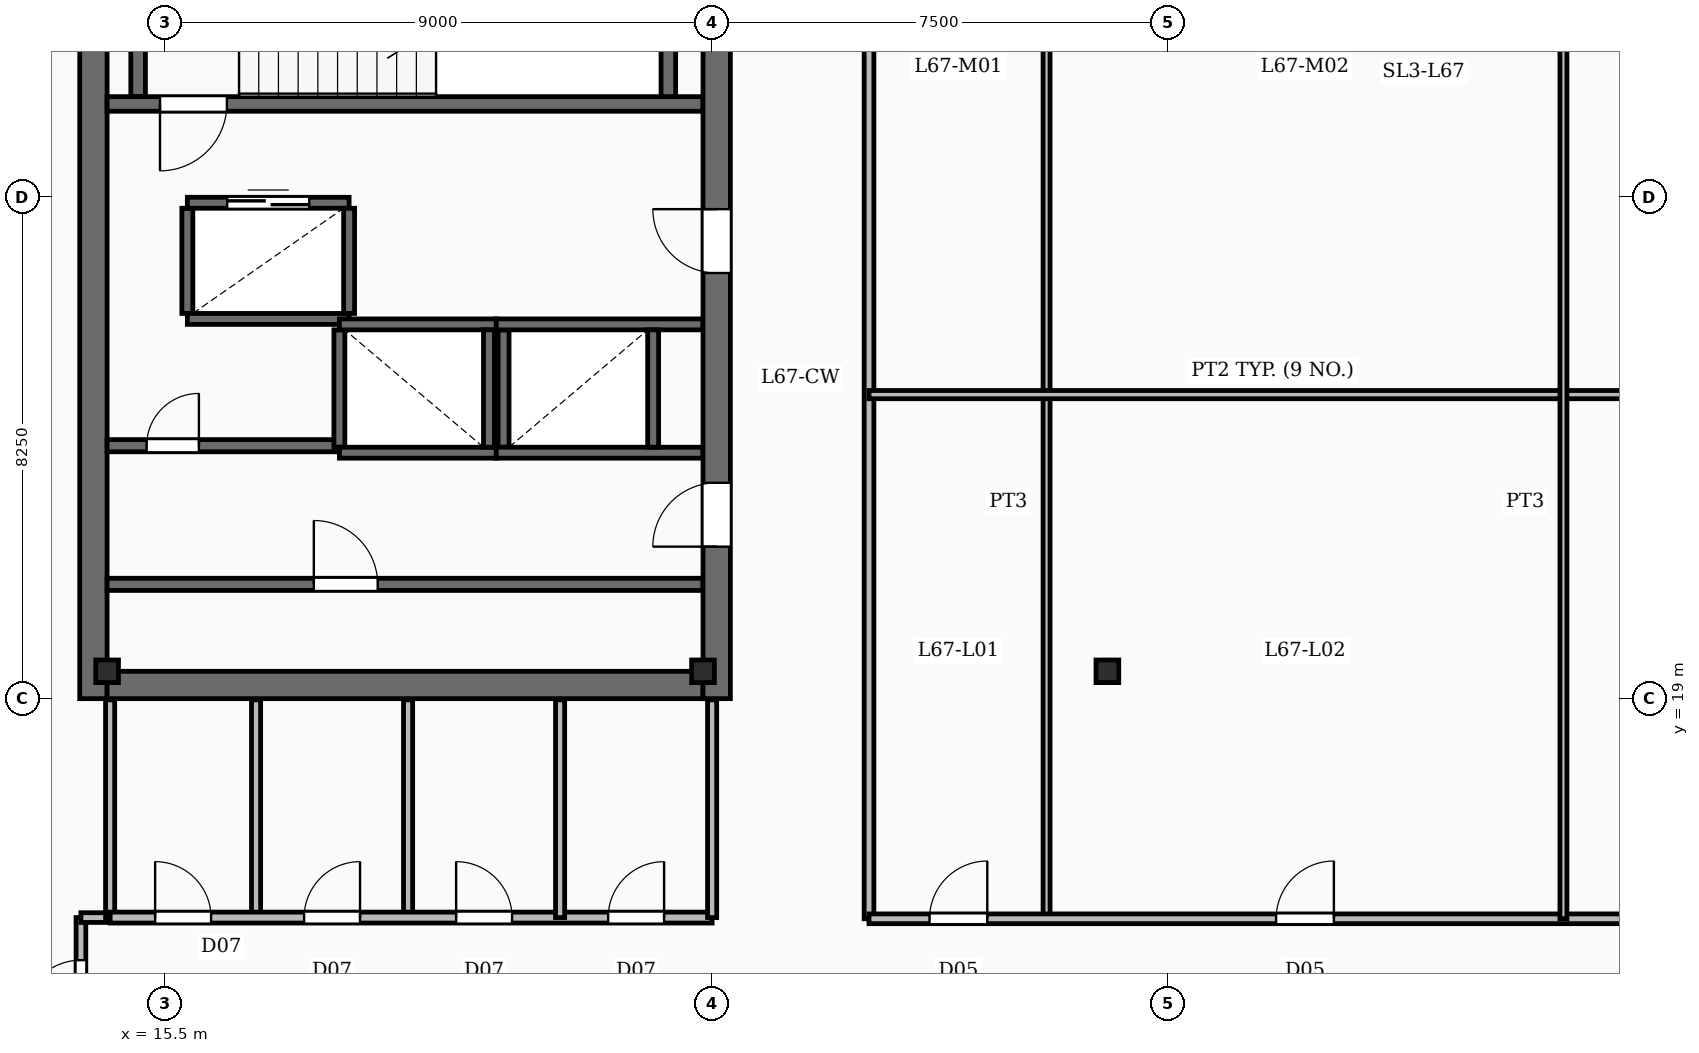
"""IFC4 building model, lengths in metres.
Left out: names, types, materials, properties, quantities, classifications, styles, units other than length and angle.
Written with IfcOpenShell. Run it as: python <this file> out.ifc"""

import sys

from ifc_helpers import new_model, si_unit, direction, frame, frame_2d, origin, origin_2d, place, context, subcontext, project, spatial, rectangle, i_section, extrude, element, fill, save


model = new_model("IFC4")
c1 = context("Model", 3, precision=1e-05, world=origin(), true_north=direction((0.0, 1.0)))
c2 = subcontext(c1, "Body", "Model", "MODEL_VIEW")
j1 = project(units=[si_unit("LENGTHUNIT", "METRE"), si_unit("PLANEANGLEUNIT", "RADIAN")], contexts=[c1])
p1 = place(None, origin())
s1 = spatial("IfcSite", under=j1, at=p1, CompositionType="ELEMENT")
p2 = place(p1, origin())
s2 = spatial("IfcBuilding", under=s1, at=p2, CompositionType="ELEMENT")
p3 = place(p2, frame((0.0, 0.0, 274.9)))
s3 = spatial("IfcBuildingStorey", under=s2, at=p3, CompositionType="ELEMENT", Elevation=274.9)
p4 = place(p3, frame((14.325, 19.0, -0.45), z_axis=(0.0, 0.0, 1.0), x_axis=(0.0, 1.0, 0.0)))
e1 = element("IfcWall", 1, at=p4, inside=s3, PredefinedType="SHEAR", context=c2, shape_type="SweptSolid", body=[
    extrude(rectangle(XDim=15.3, YDim=0.45, at=frame_2d((7.65, 0.0))), origin(), (0.0, 0.0, 1.0), 3.93),
])
p5 = place(p3, frame((24.575, 19.0, -0.45), z_axis=(0.0, 0.0, 1.0), x_axis=(0.0, 1.0, 0.0)))
e2 = element("IfcWall", 2, at=p5, inside=s3, PredefinedType="SHEAR", context=c2, shape_type="SweptSolid", body=[
    extrude(rectangle(XDim=15.3, YDim=0.45, at=frame_2d((7.65, 0.0))), origin(), (0.0, 0.0, 1.0), 3.93),
])
p6 = place(p5, frame((2.5, 0.0, 0.45)))
e3 = element("IfcOpeningElement", 3, at=p6, cuts=e2, PredefinedType="OPENING", context=c2, shape_type="SweptSolid", body=[
    extrude(rectangle(XDim=1.05, YDim=2.15, at=frame_2d((0.525, 1.075))), frame((0.0, 0.235, 0.0), z_axis=(0.0, -1.0, 0.0), x_axis=(1.0, 0.0, 0.0)), (0.0, 0.0, 1.0), 0.47),
])
p7 = place(p5, frame((7.0, 0.0, 0.45)))
e4 = element("IfcOpeningElement", 4, at=p7, cuts=e2, PredefinedType="OPENING", context=c2, shape_type="SweptSolid", body=[
    extrude(rectangle(XDim=1.05, YDim=2.15, at=frame_2d((0.525, 1.075))), frame((0.0, 0.235, 0.0), z_axis=(0.0, -1.0, 0.0), x_axis=(1.0, 0.0, 0.0)), (0.0, 0.0, 1.0), 0.47),
])
p8 = place(p3, frame((14.55, 19.225, -0.45), z_axis=(0.0, 0.0, 1.0), x_axis=(1.0, 0.0, 0.0)))
e5 = element("IfcWall", 5, at=p8, inside=s3, PredefinedType="SHEAR", context=c2, shape_type="SweptSolid", body=[
    extrude(rectangle(XDim=9.8, YDim=0.45, at=frame_2d((4.9, 0.0))), origin(), (0.0, 0.0, 1.0), 3.93),
])
for number, where, z_axis, x_axis in (
    (6, (14.55, 19.45, -0.45), (0.0, 0.0, 1.0), (1.0, 0.0, 0.0)),
    (7, (24.35, 19.45, -0.45), (0.0, 0.0, 1.0), (1.0, 0.0, 0.0)),
    (8, (31.0, 19.45, -0.45), (0.0, 0.0, 1.0), (1.0, 0.0, 0.0)),
):
    element("IfcColumn", number, at=place(p3, frame(where, z_axis=z_axis, x_axis=x_axis)), inside=s3, PredefinedType="COLUMN", context=c2, shape_type="SweptSolid", body=[
        extrude(i_section(OverallWidth=0.374, OverallDepth=0.372, WebThickness=0.016, FlangeThickness=0.026, FilletRadius=0.02, at=origin_2d()), origin(), (0.0, 0.0, 1.0), 3.93),
    ])
p9 = place(p3, frame((24.35, 28.78, 0.0), z_axis=(0.0, 0.0, 1.0), x_axis=(-1.0, 0.0, 0.0)))
e9 = element("IfcWall", 9, at=p9, inside=s3, PredefinedType="SOLIDWALL", context=c2, shape_type="SweptSolid", body=[
    extrude(rectangle(XDim=9.8, YDim=0.24, at=frame_2d((4.9, 0.0))), origin(), (0.0, 0.0, 1.0), 3.48),
])
p10 = place(p9, frame((7.83, 0.0, 0.0)))
e10 = element("IfcOpeningElement", 10, at=p10, cuts=e9, PredefinedType="OPENING", context=c2, shape_type="SweptSolid", body=[
    extrude(rectangle(XDim=1.1, YDim=2.15, at=frame_2d((0.55, 1.075))), frame((0.0, 0.13, 0.0), z_axis=(0.0, -1.0, 0.0), x_axis=(1.0, 0.0, 0.0)), (0.0, 0.0, 1.0), 0.26),
])
for number, where, z_axis, x_axis in (
    (11, (15.06, 28.9, 0.0), (0.0, 0.0, 1.0), (0.0, 1.0, 0.0)),
    (12, (23.78, 28.9, 0.0), (0.0, 0.0, 1.0), (0.0, 1.0, 0.0)),
):
    element("IfcWall", number, at=place(p3, frame(where, z_axis=z_axis, x_axis=x_axis)), inside=s3, PredefinedType="SOLIDWALL", context=c2, shape_type="SweptSolid", body=[
        extrude(rectangle(XDim=3.23, YDim=0.24, at=frame_2d((1.615, 0.0))), origin(), (0.0, 0.0, 1.0), 3.48),
    ])
for number, where, z_axis, x_axis in (
    (13, (18.37, 25.155, 0.0), (0.0, 0.0, 1.0), (1.0, 0.0, 0.0)),
    (14, (18.37, 23.045, 0.0), (0.0, 0.0, 1.0), (1.0, 0.0, 0.0)),
):
    element("IfcWall", number, at=place(p3, frame(where, z_axis=z_axis, x_axis=x_axis)), inside=s3, PredefinedType="SOLIDWALL", context=c2, shape_type="SweptSolid", body=[
        extrude(rectangle(XDim=2.58, YDim=0.18, at=frame_2d((1.29, 0.0))), origin(), (0.0, 0.0, 1.0), 3.48),
    ])
for number, where, z_axis, x_axis in (
    (15, (18.37, 23.135, 0.0), (0.0, 0.0, 1.0), (0.0, 1.0, 0.0)),
    (16, (20.83, 23.135, 0.0), (0.0, 0.0, 1.0), (0.0, 1.0, 0.0)),
):
    element("IfcWall", number, at=place(p3, frame(where, z_axis=z_axis, x_axis=x_axis)), inside=s3, PredefinedType="SOLIDWALL", context=c2, shape_type="SweptSolid", body=[
        extrude(rectangle(XDim=1.93, YDim=0.18, at=frame_2d((0.965, 0.0))), origin(), (0.0, 0.0, 1.0), 3.48),
    ])
for number, where, z_axis, x_axis in (
    (17, (20.95, 25.155, 0.0), (0.0, 0.0, 1.0), (1.0, 0.0, 0.0)),
    (18, (20.95, 23.045, 0.0), (0.0, 0.0, 1.0), (1.0, 0.0, 0.0)),
):
    element("IfcWall", number, at=place(p3, frame(where, z_axis=z_axis, x_axis=x_axis)), inside=s3, PredefinedType="SOLIDWALL", context=c2, shape_type="SweptSolid", body=[
        extrude(rectangle(XDim=3.4, YDim=0.18, at=frame_2d((1.7, 0.0))), origin(), (0.0, 0.0, 1.0), 3.48),
    ])
for number, where, z_axis, x_axis in (
    (19, (21.07, 23.135, 0.0), (0.0, 0.0, 1.0), (0.0, 1.0, 0.0)),
    (20, (23.53, 23.135, 0.0), (0.0, 0.0, 1.0), (0.0, 1.0, 0.0)),
):
    element("IfcWall", number, at=place(p3, frame(where, z_axis=z_axis, x_axis=x_axis)), inside=s3, PredefinedType="SOLIDWALL", context=c2, shape_type="SweptSolid", body=[
        extrude(rectangle(XDim=1.93, YDim=0.18, at=frame_2d((0.965, 0.0))), origin(), (0.0, 0.0, 1.0), 3.48),
    ])
p11 = place(p3, frame((15.87, 27.155, 0.0), z_axis=(0.0, 0.0, 1.0), x_axis=(1.0, 0.0, 0.0)))
e21 = element("IfcWall", 21, at=p11, inside=s3, PredefinedType="SOLIDWALL", context=c2, shape_type="SweptSolid", body=[
    extrude(rectangle(XDim=2.66, YDim=0.18, at=frame_2d((1.33, 0.0))), origin(), (0.0, 0.0, 1.0), 3.48),
])
p12 = place(p11, frame((0.655, 0.0, 0.0)))
e22 = element("IfcOpeningElement", 22, at=p12, cuts=e21, PredefinedType="OPENING", context=c2, shape_type="SweptSolid", body=[
    extrude(rectangle(XDim=1.35, YDim=2.3, at=frame_2d((0.675, 1.15))), frame((0.0, 0.1, 0.0), z_axis=(0.0, -1.0, 0.0), x_axis=(1.0, 0.0, 0.0)), (0.0, 0.0, 1.0), 0.2),
])
p13 = place(p3, frame((15.87, 25.245, 0.0), z_axis=(0.0, 0.0, 1.0), x_axis=(1.0, 0.0, 0.0)))
e23 = element("IfcWall", 23, at=p13, inside=s3, PredefinedType="SOLIDWALL", context=c2, shape_type="SweptSolid", body=[
    extrude(rectangle(XDim=2.66, YDim=0.18, at=frame_2d((1.33, 0.0))), origin(), (0.0, 0.0, 1.0), 3.48),
])
for number, where, z_axis, x_axis in (
    (24, (15.87, 25.335, 0.0), (0.0, 0.0, 1.0), (0.0, 1.0, 0.0)),
    (25, (18.53, 25.335, 0.0), (0.0, 0.0, 1.0), (0.0, 1.0, 0.0)),
):
    element("IfcWall", number, at=place(p3, frame(where, z_axis=z_axis, x_axis=x_axis)), inside=s3, PredefinedType="SOLIDWALL", context=c2, shape_type="SweptSolid", body=[
        extrude(rectangle(XDim=1.73, YDim=0.18, at=frame_2d((0.865, 0.0))), origin(), (0.0, 0.0, 1.0), 3.48),
    ])
p14 = place(p3, frame((14.55, 20.88, 0.0), z_axis=(0.0, 0.0, 1.0), x_axis=(1.0, 0.0, 0.0)))
e26 = element("IfcWall", 26, at=p14, inside=s3, PredefinedType="SOLIDWALL", context=c2, shape_type="SweptSolid", body=[
    extrude(rectangle(XDim=9.8, YDim=0.2, at=frame_2d((4.9, 0.0))), origin(), (0.0, 0.0, 1.0), 2.54),
])
p15 = place(p14, frame((3.4, 0.0, 0.0)))
e27 = element("IfcOpeningElement", 27, at=p15, cuts=e26, PredefinedType="OPENING", context=c2, shape_type="SweptSolid", body=[
    extrude(rectangle(XDim=1.05, YDim=2.15, at=frame_2d((0.525, 1.075))), frame((0.0, 0.11, 0.0), z_axis=(0.0, -1.0, 0.0), x_axis=(1.0, 0.0, 0.0)), (0.0, 0.0, 1.0), 0.22),
])
p16 = place(p3, frame((14.55, 23.16, 0.0), z_axis=(0.0, 0.0, 1.0), x_axis=(1.0, 0.0, 0.0)))
e28 = element("IfcWall", 28, at=p16, inside=s3, PredefinedType="SOLIDWALL", context=c2, shape_type="SweptSolid", body=[
    extrude(rectangle(XDim=3.82, YDim=0.2, at=frame_2d((1.91, 0.0))), origin(), (0.0, 0.0, 1.0), 2.54),
])
p17 = place(p16, frame((0.65, 0.0, 0.0)))
e29 = element("IfcOpeningElement", 29, at=p17, cuts=e28, PredefinedType="OPENING", context=c2, shape_type="SweptSolid", body=[
    extrude(rectangle(XDim=0.86, YDim=2.05, at=frame_2d((0.43, 1.025))), frame((0.0, 0.11, 0.0), z_axis=(0.0, -1.0, 0.0), x_axis=(1.0, 0.0, 0.0)), (0.0, 0.0, 1.0), 0.22),
])
for number, where, z_axis, x_axis in (
    (30, (17.0, 15.4, 0.0), (0.0, 0.0, 1.0), (0.0, 1.0, 0.0)),
    (31, (19.5, 15.4, 0.0), (0.0, 0.0, 1.0), (0.0, 1.0, 0.0)),
    (32, (22.0, 15.4, 0.0), (0.0, 0.0, 1.0), (0.0, 1.0, 0.0)),
):
    element("IfcWall", number, at=place(p3, frame(where, z_axis=z_axis, x_axis=x_axis)), inside=s3, PredefinedType="PARTITIONING", context=c2, shape_type="SweptSolid", body=[
        extrude(rectangle(XDim=3.58, YDim=0.15, at=frame_2d((1.79, 0.0))), origin(), (0.0, 0.0, 1.0), 2.54),
    ])
p18 = place(p3, frame((14.6, 15.4, 0.0), z_axis=(0.0, 0.0, 1.0), x_axis=(1.0, 0.0, 0.0)))
e33 = element("IfcWall", 33, at=p18, inside=s3, PredefinedType="PARTITIONING", context=c2, shape_type="SweptSolid", body=[
    extrude(rectangle(XDim=9.9, YDim=0.18, at=frame_2d((4.95, 0.0))), origin(), (0.0, 0.0, 1.0), 2.54),
])
p19 = place(p18, frame((0.74, 0.0, 0.0)))
e34 = element("IfcOpeningElement", 34, at=p19, cuts=e33, PredefinedType="OPENING", context=c2, shape_type="SweptSolid", body=[
    extrude(rectangle(XDim=0.92, YDim=2.1, at=frame_2d((0.46, 1.05))), frame((0.0, 0.1, 0.0), z_axis=(0.0, -1.0, 0.0), x_axis=(1.0, 0.0, 0.0)), (0.0, 0.0, 1.0), 0.2),
])
p20 = place(p18, frame((3.19, 0.0, 0.0)))
e35 = element("IfcOpeningElement", 35, at=p20, cuts=e33, PredefinedType="OPENING", context=c2, shape_type="SweptSolid", body=[
    extrude(rectangle(XDim=0.92, YDim=2.1, at=frame_2d((0.46, 1.05))), frame((0.0, 0.1, 0.0), z_axis=(0.0, -1.0, 0.0), x_axis=(1.0, 0.0, 0.0)), (0.0, 0.0, 1.0), 0.2),
])
p21 = place(p18, frame((5.69, 0.0, 0.0)))
e36 = element("IfcOpeningElement", 36, at=p21, cuts=e33, PredefinedType="OPENING", context=c2, shape_type="SweptSolid", body=[
    extrude(rectangle(XDim=0.92, YDim=2.1, at=frame_2d((0.46, 1.05))), frame((0.0, 0.1, 0.0), z_axis=(0.0, -1.0, 0.0), x_axis=(1.0, 0.0, 0.0)), (0.0, 0.0, 1.0), 0.2),
])
p22 = place(p18, frame((8.19, 0.0, 0.0)))
e37 = element("IfcOpeningElement", 37, at=p22, cuts=e33, PredefinedType="OPENING", context=c2, shape_type="SweptSolid", body=[
    extrude(rectangle(XDim=0.92, YDim=2.1, at=frame_2d((0.46, 1.05))), frame((0.0, 0.1, 0.0), z_axis=(0.0, -1.0, 0.0), x_axis=(1.0, 0.0, 0.0)), (0.0, 0.0, 1.0), 0.2),
])
for number, where, z_axis, x_axis in (
    (38, (14.6, 15.4, 0.0), (0.0, 0.0, 1.0), (0.0, 1.0, 0.0)),
    (39, (24.5, 15.4, 0.0), (0.0, 0.0, 1.0), (0.0, 1.0, 0.0)),
):
    element("IfcWall", number, at=place(p3, frame(where, z_axis=z_axis, x_axis=x_axis)), inside=s3, PredefinedType="PARTITIONING", context=c2, shape_type="SweptSolid", body=[
        extrude(rectangle(XDim=3.58, YDim=0.15, at=frame_2d((1.79, 0.0))), origin(), (0.0, 0.0, 1.0), 2.54),
    ])
for number, where, z_axis, x_axis in (
    (40, (30.0, 15.38, 0.0), (0.0, 0.0, 1.0), (0.0, 1.0, 0.0)),
    (41, (38.5, 15.38, 0.0), (0.0, 0.0, 1.0), (0.0, 1.0, 0.0)),
):
    element("IfcWall", number, at=place(p3, frame(where, z_axis=z_axis, x_axis=x_axis)), inside=s3, PredefinedType="PARTITIONING", context=c2, shape_type="SweptSolid", body=[
        extrude(rectangle(XDim=19.6, YDim=0.115, at=frame_2d((9.8, 0.0))), origin(), (0.0, 0.0, 1.0), 2.54),
    ])
p23 = place(p3, frame((27.08, 24.0, 0.0), z_axis=(0.0, 0.0, 1.0), x_axis=(1.0, 0.0, 0.0)))
e42 = element("IfcWall", 42, at=p23, inside=s3, PredefinedType="PARTITIONING", context=c2, shape_type="SweptSolid", body=[
    extrude(rectangle(XDim=20.74, YDim=0.135, at=frame_2d((10.37, 0.0))), origin(), (0.0, 0.0, 1.0), 2.54),
])
p24 = place(p3, frame((27.08, 15.38, 0.0), z_axis=(0.0, 0.0, 1.0), x_axis=(1.0, 0.0, 0.0)))
e43 = element("IfcWall", 43, at=p24, inside=s3, PredefinedType="PARTITIONING", context=c2, shape_type="SweptSolid", body=[
    extrude(rectangle(XDim=20.74, YDim=0.16, at=frame_2d((10.37, 0.0))), origin(), (0.0, 0.0, 1.0), 2.54),
])
p25 = place(p24, frame((0.995, 0.0, 0.0)))
e44 = element("IfcOpeningElement", 44, at=p25, cuts=e43, PredefinedType="OPENING", context=c2, shape_type="SweptSolid", body=[
    extrude(rectangle(XDim=0.95, YDim=2.15, at=frame_2d((0.475, 1.075))), frame((0.0, 0.09, 0.0), z_axis=(0.0, -1.0, 0.0), x_axis=(1.0, 0.0, 0.0)), (0.0, 0.0, 1.0), 0.18),
])
p26 = place(p24, frame((6.695, 0.0, 0.0)))
e45 = element("IfcOpeningElement", 45, at=p26, cuts=e43, PredefinedType="OPENING", context=c2, shape_type="SweptSolid", body=[
    extrude(rectangle(XDim=0.95, YDim=2.15, at=frame_2d((0.475, 1.075))), frame((0.0, 0.09, 0.0), z_axis=(0.0, -1.0, 0.0), x_axis=(1.0, 0.0, 0.0)), (0.0, 0.0, 1.0), 0.18),
])
p27 = place(p24, frame((13.945, 0.0, 0.0)))
e46 = element("IfcOpeningElement", 46, at=p27, cuts=e43, PredefinedType="OPENING", context=c2, shape_type="SweptSolid", body=[
    extrude(rectangle(XDim=0.95, YDim=2.15, at=frame_2d((0.475, 1.075))), frame((0.0, 0.09, 0.0), z_axis=(0.0, -1.0, 0.0), x_axis=(1.0, 0.0, 0.0)), (0.0, 0.0, 1.0), 0.18),
])
p28 = place(p24, frame((18.595, 0.0, 0.0)))
e47 = element("IfcOpeningElement", 47, at=p28, cuts=e43, PredefinedType="OPENING", context=c2, shape_type="SweptSolid", body=[
    extrude(rectangle(XDim=0.95, YDim=2.15, at=frame_2d((0.475, 1.075))), frame((0.0, 0.09, 0.0), z_axis=(0.0, -1.0, 0.0), x_axis=(1.0, 0.0, 0.0)), (0.0, 0.0, 1.0), 0.18),
])
p29 = place(p3, frame((27.08, 15.38, 0.0), z_axis=(0.0, 0.0, 1.0), x_axis=(0.0, 1.0, 0.0)))
e48 = element("IfcWall", 48, at=p29, inside=s3, PredefinedType="PARTITIONING", context=c2, shape_type="SweptSolid", body=[
    extrude(rectangle(XDim=19.6, YDim=0.16, at=frame_2d((9.8, 0.0))), origin(), (0.0, 0.0, 1.0), 2.54),
])
p30 = place(p3, frame((14.12, 13.1, 0.0), z_axis=(0.0, 0.0, 1.0), x_axis=(0.0, 1.0, 0.0)))
e49 = element("IfcWall", 49, at=p30, inside=s3, PredefinedType="PARTITIONING", context=c2, shape_type="SweptSolid", body=[
    extrude(rectangle(XDim=2.3, YDim=0.16, at=frame_2d((1.15, 0.0))), origin(), (0.0, 0.0, 1.0), 2.54),
])
p31 = place(p30, frame((0.65, 0.0, 0.0)))
e50 = element("IfcOpeningElement", 50, at=p31, cuts=e49, PredefinedType="OPENING", context=c2, shape_type="SweptSolid", body=[
    extrude(rectangle(XDim=0.95, YDim=2.15, at=frame_2d((0.475, 1.075))), frame((0.0, 0.09, 0.0), z_axis=(0.0, -1.0, 0.0), x_axis=(1.0, 0.0, 0.0)), (0.0, 0.0, 1.0), 0.18),
])
p32 = place(p3, frame((14.12, 15.4, 0.0), z_axis=(0.0, 0.0, 1.0), x_axis=(1.0, 0.0, 0.0)))
e51 = element("IfcWall", 51, at=p32, inside=s3, PredefinedType="PARTITIONING", context=c2, shape_type="SweptSolid", body=[
    extrude(rectangle(XDim=0.5, YDim=0.16, at=frame_2d((0.25, 0.0))), origin(), (0.0, 0.0, 1.0), 2.54),
])
p33 = place(p6, origin())
e52 = element("IfcDoor", 52, at=p33, inside=s3, OperationType="SINGLE_SWING_LEFT", PredefinedType="DOOR", context=c2, shape_type="SweptSolid", body=[
    extrude(rectangle(XDim=1.05, YDim=2.15, at=frame_2d((0.525, 1.075))), frame((0.0, 0.025, 0.0), z_axis=(0.0, -1.0, 0.0), x_axis=(1.0, 0.0, 0.0)), (0.0, 0.0, 1.0), 0.05),
])
fill(e3, e52)
p34 = place(p7, origin())
e53 = element("IfcDoor", 53, at=p34, inside=s3, OperationType="SINGLE_SWING_RIGHT", PredefinedType="DOOR", context=c2, shape_type="SweptSolid", body=[
    extrude(rectangle(XDim=1.05, YDim=2.15, at=frame_2d((0.525, 1.075))), frame((0.0, 0.025, 0.0), z_axis=(0.0, -1.0, 0.0), x_axis=(1.0, 0.0, 0.0)), (0.0, 0.0, 1.0), 0.05),
])
fill(e4, e53)
p35 = place(p10, origin())
e54 = element("IfcDoor", 54, at=p35, inside=s3, OperationType="SINGLE_SWING_RIGHT", PredefinedType="DOOR", context=c2, shape_type="SweptSolid", body=[
    extrude(rectangle(XDim=1.1, YDim=2.15, at=frame_2d((0.55, 1.075))), frame((0.0, 0.025, 0.0), z_axis=(0.0, -1.0, 0.0), x_axis=(1.0, 0.0, 0.0)), (0.0, 0.0, 1.0), 0.05),
])
fill(e10, e54)
p36 = place(p12, origin())
e55 = element("IfcDoor", 55, at=p36, inside=s3, OperationType="DOUBLE_DOOR_SLIDING", PredefinedType="DOOR", context=c2, shape_type="SweptSolid", body=[
    extrude(rectangle(XDim=1.35, YDim=2.3, at=frame_2d((0.675, 1.15))), frame((0.0, 0.025, 0.0), z_axis=(0.0, -1.0, 0.0), x_axis=(1.0, 0.0, 0.0)), (0.0, 0.0, 1.0), 0.05),
])
fill(e22, e55)
p37 = place(p15, origin())
e56 = element("IfcDoor", 56, at=p37, inside=s3, OperationType="SINGLE_SWING_LEFT", PredefinedType="DOOR", context=c2, shape_type="SweptSolid", body=[
    extrude(rectangle(XDim=1.05, YDim=2.15, at=frame_2d((0.525, 1.075))), frame((0.0, 0.025, 0.0), z_axis=(0.0, -1.0, 0.0), x_axis=(1.0, 0.0, 0.0)), (0.0, 0.0, 1.0), 0.05),
])
fill(e27, e56)
p38 = place(p17, origin())
e57 = element("IfcDoor", 57, at=p38, inside=s3, OperationType="SINGLE_SWING_RIGHT", PredefinedType="DOOR", context=c2, shape_type="SweptSolid", body=[
    extrude(rectangle(XDim=0.86, YDim=2.05, at=frame_2d((0.43, 1.025))), frame((0.0, 0.025, 0.0), z_axis=(0.0, -1.0, 0.0), x_axis=(1.0, 0.0, 0.0)), (0.0, 0.0, 1.0), 0.05),
])
fill(e29, e57)
p39 = place(p19, origin())
e58 = element("IfcDoor", 58, at=p39, inside=s3, OperationType="SINGLE_SWING_LEFT", PredefinedType="DOOR", context=c2, shape_type="SweptSolid", body=[
    extrude(rectangle(XDim=0.92, YDim=2.1, at=frame_2d((0.46, 1.05))), frame((0.0, 0.025, 0.0), z_axis=(0.0, -1.0, 0.0), x_axis=(1.0, 0.0, 0.0)), (0.0, 0.0, 1.0), 0.05),
])
fill(e34, e58)
p40 = place(p20, origin())
e59 = element("IfcDoor", 59, at=p40, inside=s3, OperationType="SINGLE_SWING_RIGHT", PredefinedType="DOOR", context=c2, shape_type="SweptSolid", body=[
    extrude(rectangle(XDim=0.92, YDim=2.1, at=frame_2d((0.46, 1.05))), frame((0.0, 0.025, 0.0), z_axis=(0.0, -1.0, 0.0), x_axis=(1.0, 0.0, 0.0)), (0.0, 0.0, 1.0), 0.05),
])
fill(e35, e59)
p41 = place(p21, origin())
e60 = element("IfcDoor", 60, at=p41, inside=s3, OperationType="SINGLE_SWING_LEFT", PredefinedType="DOOR", context=c2, shape_type="SweptSolid", body=[
    extrude(rectangle(XDim=0.92, YDim=2.1, at=frame_2d((0.46, 1.05))), frame((0.0, 0.025, 0.0), z_axis=(0.0, -1.0, 0.0), x_axis=(1.0, 0.0, 0.0)), (0.0, 0.0, 1.0), 0.05),
])
fill(e36, e60)
p42 = place(p22, origin())
e61 = element("IfcDoor", 61, at=p42, inside=s3, OperationType="SINGLE_SWING_RIGHT", PredefinedType="DOOR", context=c2, shape_type="SweptSolid", body=[
    extrude(rectangle(XDim=0.92, YDim=2.1, at=frame_2d((0.46, 1.05))), frame((0.0, 0.025, 0.0), z_axis=(0.0, -1.0, 0.0), x_axis=(1.0, 0.0, 0.0)), (0.0, 0.0, 1.0), 0.05),
])
fill(e37, e61)
p43 = place(p25, origin())
e62 = element("IfcDoor", 62, at=p43, inside=s3, OperationType="SINGLE_SWING_RIGHT", PredefinedType="DOOR", context=c2, shape_type="SweptSolid", body=[
    extrude(rectangle(XDim=0.95, YDim=2.15, at=frame_2d((0.475, 1.075))), frame((0.0, 0.025, 0.0), z_axis=(0.0, -1.0, 0.0), x_axis=(1.0, 0.0, 0.0)), (0.0, 0.0, 1.0), 0.05),
])
fill(e44, e62)
p44 = place(p26, origin())
e63 = element("IfcDoor", 63, at=p44, inside=s3, OperationType="SINGLE_SWING_RIGHT", PredefinedType="DOOR", context=c2, shape_type="SweptSolid", body=[
    extrude(rectangle(XDim=0.95, YDim=2.15, at=frame_2d((0.475, 1.075))), frame((0.0, 0.025, 0.0), z_axis=(0.0, -1.0, 0.0), x_axis=(1.0, 0.0, 0.0)), (0.0, 0.0, 1.0), 0.05),
])
fill(e45, e63)
p45 = place(p31, origin())
e64 = element("IfcDoor", 64, at=p45, inside=s3, OperationType="SINGLE_SWING_LEFT", PredefinedType="DOOR", context=c2, shape_type="SweptSolid", body=[
    extrude(rectangle(XDim=0.95, YDim=2.15, at=frame_2d((0.475, 1.075))), frame((0.0, 0.025, 0.0), z_axis=(0.0, -1.0, 0.0), x_axis=(1.0, 0.0, 0.0)), (0.0, 0.0, 1.0), 0.05),
])
fill(e50, e64)
save(model, sys.argv[1])
